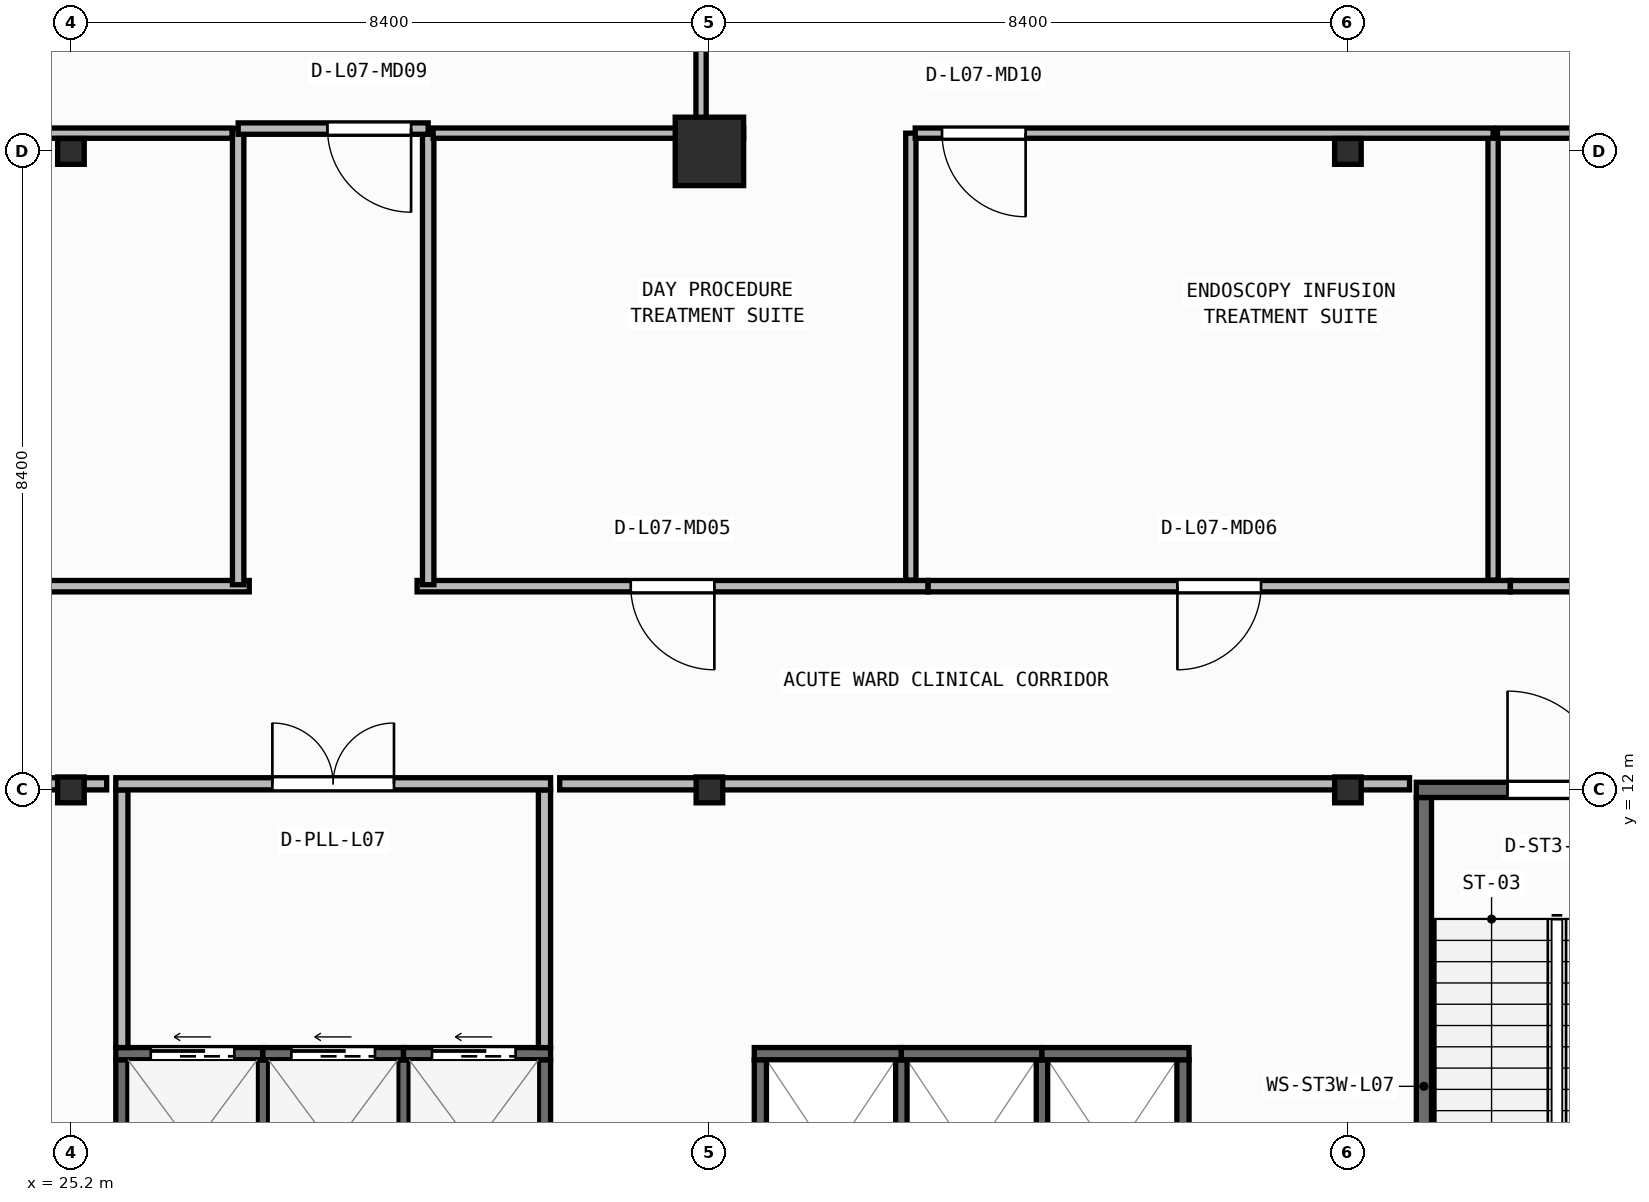
"""IFC4 building model, lengths in metres.
Left out: names, types, materials, properties, quantities, classifications, styles, units other than length and angle.
Written with IfcOpenShell. Run it as: python <this file> out.ifc"""

import sys

from ifc_helpers import new_model, si_unit, direction, frame, frame_2d, origin, origin_2d, place, context, subcontext, project, spatial, rectangle, i_section, extrude, element, fill, save


model = new_model("IFC4")
c1 = context("Model", 3, precision=1e-05, world=origin(), true_north=direction((0.0, 1.0)))
c2 = subcontext(c1, "Body", "Model", "MODEL_VIEW")
j1 = project(units=[si_unit("LENGTHUNIT", "METRE"), si_unit("PLANEANGLEUNIT", "RADIAN")], contexts=[c1])
p1 = place(None, origin())
s1 = spatial("IfcSite", under=j1, at=p1, CompositionType="ELEMENT")
p2 = place(p1, origin())
s2 = spatial("IfcBuilding", under=s1, at=p2, CompositionType="ELEMENT")
p3 = place(p2, frame((0.0, 0.0, 30.4)))
s3 = spatial("IfcBuildingStorey", under=s2, at=p3, CompositionType="ELEMENT", Elevation=30.4)
for number, where, z_axis, x_axis in (
    (1, (25.2, 12.0, 0.0), (0.0, 0.0, 1.0), (1.0, 0.0, 0.0)),
    (2, (33.6, 12.0, 0.0), (0.0, 0.0, 1.0), (1.0, 0.0, 0.0)),
    (3, (42.0, 12.0, 0.0), (0.0, 0.0, 1.0), (1.0, 0.0, 0.0)),
    (4, (25.2, 20.4, 0.0), (0.0, 0.0, 1.0), (1.0, 0.0, 0.0)),
):
    element("IfcColumn", number, at=place(p3, frame(where, z_axis=z_axis, x_axis=x_axis)), inside=s3, PredefinedType="COLUMN", context=c2, shape_type="SweptSolid", body=[
        extrude(i_section(OverallWidth=0.35, OverallDepth=0.34, WebThickness=0.016, FlangeThickness=0.028, at=origin_2d()), origin(), (0.0, 0.0, 1.0), 3.95),
    ])
p4 = place(p3, frame((33.6, 20.4, 0.0), z_axis=(0.0, 0.0, 1.0), x_axis=(1.0, 0.0, 0.0)))
e5 = element("IfcColumn", 5, at=p4, inside=s3, PredefinedType="COLUMN", context=c2, shape_type="SweptSolid", body=[
    extrude(rectangle(XDim=0.9, YDim=0.9, at=origin_2d()), origin(), (0.0, 0.0, 1.0), 3.95),
])
p5 = place(p3, frame((42.0, 20.4, 0.0), z_axis=(0.0, 0.0, 1.0), x_axis=(1.0, 0.0, 0.0)))
e6 = element("IfcColumn", 6, at=p5, inside=s3, PredefinedType="COLUMN", context=c2, shape_type="SweptSolid", body=[
    extrude(i_section(OverallWidth=0.35, OverallDepth=0.34, WebThickness=0.016, FlangeThickness=0.028, at=origin_2d()), origin(), (0.0, 0.0, 1.0), 3.95),
])
p6 = place(p3, frame((43.0, 4.3, 0.0), z_axis=(0.0, 0.0, 1.0), x_axis=(0.0, 1.0, 0.0)))
e7 = element("IfcWall", 7, at=p6, inside=s3, PredefinedType="SHEAR", context=c2, shape_type="SweptSolid", body=[
    extrude(rectangle(XDim=7.6, YDim=0.2, at=frame_2d((3.8, 0.0))), origin(), (0.0, 0.0, 1.0), 3.71),
])
p7 = place(p3, frame((42.9, 12.0, 0.0), z_axis=(0.0, 0.0, 1.0), x_axis=(1.0, 0.0, 0.0)))
e8 = element("IfcWall", 8, at=p7, inside=s3, PredefinedType="SHEAR", context=c2, shape_type="SweptSolid", body=[
    extrude(rectangle(XDim=3.7, YDim=0.2, at=frame_2d((1.85, 0.0))), origin(), (0.0, 0.0, 1.0), 3.71),
])
p8 = place(p7, frame((1.2, 0.0, 0.0)))
e9 = element("IfcOpeningElement", 9, at=p8, cuts=e8, PredefinedType="OPENING", context=c2, shape_type="SweptSolid", body=[
    extrude(rectangle(XDim=1.3, YDim=2.15, at=frame_2d((0.65, 1.075))), frame((0.0, 0.11, 0.0), z_axis=(0.0, -1.0, 0.0), x_axis=(1.0, 0.0, 0.0)), (0.0, 0.0, 1.0), 0.22),
])
for number, where, z_axis, x_axis in (
    (10, (25.87, 5.9, 0.0), (0.0, 0.0, 1.0), (0.0, 1.0, 0.0)),
    (11, (31.43, 5.9, 0.0), (0.0, 0.0, 1.0), (0.0, 1.0, 0.0)),
):
    element("IfcWall", number, at=place(p3, frame(where, z_axis=z_axis, x_axis=x_axis)), inside=s3, PredefinedType="SHEAR", context=c2, shape_type="SweptSolid", body=[
        extrude(rectangle(XDim=2.55, YDim=0.16, at=frame_2d((1.275, 0.0))), origin(), (0.0, 0.0, 1.0), 3.71),
    ])
for number, where, z_axis, x_axis in (
    (12, (27.725, 5.9, 0.0), (0.0, 0.0, 1.0), (0.0, 1.0, 0.0)),
    (13, (29.575, 5.9, 0.0), (0.0, 0.0, 1.0), (0.0, 1.0, 0.0)),
):
    element("IfcWall", number, at=place(p3, frame(where, z_axis=z_axis, x_axis=x_axis)), inside=s3, PredefinedType="SHEAR", context=c2, shape_type="SweptSolid", body=[
        extrude(rectangle(XDim=2.55, YDim=0.15, at=frame_2d((1.275, 0.0))), origin(), (0.0, 0.0, 1.0), 3.71),
    ])
p9 = place(p3, frame((25.79, 8.53, 0.0), z_axis=(0.0, 0.0, 1.0), x_axis=(1.0, 0.0, 0.0)))
e14 = element("IfcWall", 14, at=p9, inside=s3, PredefinedType="SHEAR", context=c2, shape_type="SweptSolid", body=[
    extrude(rectangle(XDim=1.935, YDim=0.16, at=frame_2d((0.968, 0.0))), origin(), (0.0, 0.0, 1.0), 3.71),
])
p10 = place(p9, frame((0.46, 0.0, 0.0)))
e15 = element("IfcOpeningElement", 15, at=p10, cuts=e14, PredefinedType="OPENING", context=c2, shape_type="SweptSolid", body=[
    extrude(rectangle(XDim=1.1, YDim=2.15, at=frame_2d((0.55, 1.075))), frame((0.0, 0.09, 0.0), z_axis=(0.0, -1.0, 0.0), x_axis=(1.0, 0.0, 0.0)), (0.0, 0.0, 1.0), 0.18),
])
p11 = place(p3, frame((27.725, 8.53, 0.0), z_axis=(0.0, 0.0, 1.0), x_axis=(1.0, 0.0, 0.0)))
e16 = element("IfcWall", 16, at=p11, inside=s3, PredefinedType="SHEAR", context=c2, shape_type="SweptSolid", body=[
    extrude(rectangle(XDim=1.85, YDim=0.16, at=frame_2d((0.925, 0.0))), origin(), (0.0, 0.0, 1.0), 3.71),
])
p12 = place(p11, frame((0.375, 0.0, 0.0)))
e17 = element("IfcOpeningElement", 17, at=p12, cuts=e16, PredefinedType="OPENING", context=c2, shape_type="SweptSolid", body=[
    extrude(rectangle(XDim=1.1, YDim=2.15, at=frame_2d((0.55, 1.075))), frame((0.0, 0.09, 0.0), z_axis=(0.0, -1.0, 0.0), x_axis=(1.0, 0.0, 0.0)), (0.0, 0.0, 1.0), 0.18),
])
p13 = place(p3, frame((29.575, 8.53, 0.0), z_axis=(0.0, 0.0, 1.0), x_axis=(1.0, 0.0, 0.0)))
e18 = element("IfcWall", 18, at=p13, inside=s3, PredefinedType="SHEAR", context=c2, shape_type="SweptSolid", body=[
    extrude(rectangle(XDim=1.935, YDim=0.16, at=frame_2d((0.968, 0.0))), origin(), (0.0, 0.0, 1.0), 3.71),
])
p14 = place(p13, frame((0.375, 0.0, 0.0)))
e19 = element("IfcOpeningElement", 19, at=p14, cuts=e18, PredefinedType="OPENING", context=c2, shape_type="SweptSolid", body=[
    extrude(rectangle(XDim=1.1, YDim=2.15, at=frame_2d((0.55, 1.075))), frame((0.0, 0.09, 0.0), z_axis=(0.0, -1.0, 0.0), x_axis=(1.0, 0.0, 0.0)), (0.0, 0.0, 1.0), 0.18),
])
for number, where, z_axis, x_axis in (
    (20, (34.27, 5.9, 0.0), (0.0, 0.0, 1.0), (0.0, 1.0, 0.0)),
    (21, (39.83, 5.9, 0.0), (0.0, 0.0, 1.0), (0.0, 1.0, 0.0)),
):
    element("IfcWall", number, at=place(p3, frame(where, z_axis=z_axis, x_axis=x_axis)), inside=s3, PredefinedType="SHEAR", context=c2, shape_type="SweptSolid", body=[
        extrude(rectangle(XDim=2.55, YDim=0.16, at=frame_2d((1.275, 0.0))), origin(), (0.0, 0.0, 1.0), 3.71),
    ])
for number, where, z_axis, x_axis in (
    (22, (36.125, 5.9, 0.0), (0.0, 0.0, 1.0), (0.0, 1.0, 0.0)),
    (23, (37.975, 5.9, 0.0), (0.0, 0.0, 1.0), (0.0, 1.0, 0.0)),
):
    element("IfcWall", number, at=place(p3, frame(where, z_axis=z_axis, x_axis=x_axis)), inside=s3, PredefinedType="SHEAR", context=c2, shape_type="SweptSolid", body=[
        extrude(rectangle(XDim=2.55, YDim=0.15, at=frame_2d((1.275, 0.0))), origin(), (0.0, 0.0, 1.0), 3.71),
    ])
p15 = place(p3, frame((34.19, 8.53, 0.0), z_axis=(0.0, 0.0, 1.0), x_axis=(1.0, 0.0, 0.0)))
e24 = element("IfcWall", 24, at=p15, inside=s3, PredefinedType="SHEAR", context=c2, shape_type="SweptSolid", body=[
    extrude(rectangle(XDim=1.935, YDim=0.16, at=frame_2d((0.968, 0.0))), origin(), (0.0, 0.0, 1.0), 3.71),
])
p16 = place(p3, frame((36.125, 8.53, 0.0), z_axis=(0.0, 0.0, 1.0), x_axis=(1.0, 0.0, 0.0)))
e25 = element("IfcWall", 25, at=p16, inside=s3, PredefinedType="SHEAR", context=c2, shape_type="SweptSolid", body=[
    extrude(rectangle(XDim=1.85, YDim=0.16, at=frame_2d((0.925, 0.0))), origin(), (0.0, 0.0, 1.0), 3.71),
])
p17 = place(p3, frame((37.975, 8.53, 0.0), z_axis=(0.0, 0.0, 1.0), x_axis=(1.0, 0.0, 0.0)))
e26 = element("IfcWall", 26, at=p17, inside=s3, PredefinedType="SHEAR", context=c2, shape_type="SweptSolid", body=[
    extrude(rectangle(XDim=1.935, YDim=0.16, at=frame_2d((0.967, 0.0))), origin(), (0.0, 0.0, 1.0), 3.71),
])
for number, where, z_axis, x_axis in (
    (27, (25.87, 8.61, 0.0), (0.0, 0.0, 1.0), (0.0, 1.0, 0.0)),
    (28, (31.43, 8.61, 0.0), (0.0, 0.0, 1.0), (0.0, 1.0, 0.0)),
):
    element("IfcWall", number, at=place(p3, frame(where, z_axis=z_axis, x_axis=x_axis)), inside=s3, PredefinedType="PARTITIONING", context=c2, shape_type="SweptSolid", body=[
        extrude(rectangle(XDim=3.39, YDim=0.16, at=frame_2d((1.695, 0.0))), origin(), (0.0, 0.0, 1.0), 3.71),
    ])
p18 = place(p3, frame((25.79, 12.08, 0.0), z_axis=(0.0, 0.0, 1.0), x_axis=(1.0, 0.0, 0.0)))
e29 = element("IfcWall", 29, at=p18, inside=s3, PredefinedType="PARTITIONING", context=c2, shape_type="SweptSolid", body=[
    extrude(rectangle(XDim=5.72, YDim=0.16, at=frame_2d((2.86, 0.0))), origin(), (0.0, 0.0, 1.0), 3.073),
])
p19 = place(p18, frame((2.06, 0.0, 0.0)))
e30 = element("IfcOpeningElement", 30, at=p19, cuts=e29, PredefinedType="OPENING", context=c2, shape_type="SweptSolid", body=[
    extrude(rectangle(XDim=1.6, YDim=2.05, at=frame_2d((0.8, 1.025))), frame((0.0, 0.09, 0.0), z_axis=(0.0, -1.0, 0.0), x_axis=(1.0, 0.0, 0.0)), (0.0, 0.0, 1.0), 0.18),
])
p20 = place(p3, frame((27.546, 14.68, 0.0), z_axis=(0.0, 0.0, 1.0), x_axis=(-1.0, 0.0, 0.0)))
e31 = element("IfcWall", 31, at=p20, inside=s3, PredefinedType="PARTITIONING", context=c2, shape_type="SweptSolid", body=[
    extrude(rectangle(XDim=7.478, YDim=0.15, at=frame_2d((3.739, 0.0))), origin(), (0.0, 0.0, 1.0), 3.71),
])
p21 = place(p20, frame((3.189, 0.0, 0.0)))
e32 = element("IfcOpeningElement", 32, at=p21, cuts=e31, PredefinedType="OPENING", context=c2, shape_type="SweptSolid", body=[
    extrude(rectangle(XDim=1.1, YDim=2.1, at=frame_2d((0.55, 1.05))), frame((0.0, 0.085, 0.0), z_axis=(0.0, -1.0, 0.0), x_axis=(1.0, 0.0, 0.0)), (0.0, 0.0, 1.0), 0.17),
])
p22 = place(p3, frame((36.476, 14.68, 0.0), z_axis=(0.0, 0.0, 1.0), x_axis=(-1.0, 0.0, 0.0)))
e33 = element("IfcWall", 33, at=p22, inside=s3, PredefinedType="PARTITIONING", context=c2, shape_type="SweptSolid", body=[
    extrude(rectangle(XDim=6.722, YDim=0.15, at=frame_2d((3.361, 0.0))), origin(), (0.0, 0.0, 1.0), 3.71),
])
p23 = place(p22, frame((2.811, 0.0, 0.0)))
e34 = element("IfcOpeningElement", 34, at=p23, cuts=e33, PredefinedType="OPENING", context=c2, shape_type="SweptSolid", body=[
    extrude(rectangle(XDim=1.1, YDim=2.1, at=frame_2d((0.55, 1.05))), frame((0.0, 0.085, 0.0), z_axis=(0.0, -1.0, 0.0), x_axis=(1.0, 0.0, 0.0)), (0.0, 0.0, 1.0), 0.17),
])
p24 = place(p3, frame((44.136, 14.68, 0.0), z_axis=(0.0, 0.0, 1.0), x_axis=(-1.0, 0.0, 0.0)))
e35 = element("IfcWall", 35, at=p24, inside=s3, PredefinedType="PARTITIONING", context=c2, shape_type="SweptSolid", body=[
    extrude(rectangle(XDim=7.658, YDim=0.15, at=frame_2d((3.829, 0.0))), origin(), (0.0, 0.0, 1.0), 3.71),
])
p25 = place(p24, frame((3.279, 0.0, 0.0)))
e36 = element("IfcOpeningElement", 36, at=p25, cuts=e35, PredefinedType="OPENING", context=c2, shape_type="SweptSolid", body=[
    extrude(rectangle(XDim=1.1, YDim=2.1, at=frame_2d((0.55, 1.05))), frame((0.0, 0.085, 0.0), z_axis=(0.0, -1.0, 0.0), x_axis=(1.0, 0.0, 0.0)), (0.0, 0.0, 1.0), 0.17),
])
p26 = place(p3, frame((53.986, 14.68, 0.0), z_axis=(0.0, 0.0, 1.0), x_axis=(-1.0, 0.0, 0.0)))
e37 = element("IfcWall", 37, at=p26, inside=s3, PredefinedType="PARTITIONING", context=c2, shape_type="SweptSolid", body=[
    extrude(rectangle(XDim=9.848, YDim=0.15, at=frame_2d((4.924, 0.0))), origin(), (0.0, 0.0, 1.0), 3.71),
])
p27 = place(p26, frame((4.374, 0.0, 0.0)))
e38 = element("IfcOpeningElement", 38, at=p27, cuts=e37, PredefinedType="OPENING", context=c2, shape_type="SweptSolid", body=[
    extrude(rectangle(XDim=1.1, YDim=2.1, at=frame_2d((0.55, 1.05))), frame((0.0, 0.085, 0.0), z_axis=(0.0, -1.0, 0.0), x_axis=(1.0, 0.0, 0.0)), (0.0, 0.0, 1.0), 0.17),
])
for number, where, z_axis, x_axis in (
    (39, (27.4, 20.7, 0.0), (0.0, 0.0, 1.0), (0.0, -1.0, 0.0)),
    (40, (29.9, 14.7, 0.0), (0.0, 0.0, 1.0), (0.0, 1.0, 0.0)),
):
    element("IfcWall", number, at=place(p3, frame(where, z_axis=z_axis, x_axis=x_axis)), inside=s3, PredefinedType="PARTITIONING", context=c2, shape_type="SweptSolid", body=[
        extrude(rectangle(XDim=6.0, YDim=0.15, at=frame_2d((3.0, 0.0))), origin(), (0.0, 0.0, 1.0), 3.71),
    ])
p28 = place(p3, frame((29.9, 20.7, 0.0), z_axis=(0.0, 0.0, 1.0), x_axis=(-1.0, 0.0, 0.0)))
e41 = element("IfcWall", 41, at=p28, inside=s3, PredefinedType="PARTITIONING", context=c2, shape_type="SweptSolid", body=[
    extrude(rectangle(XDim=2.5, YDim=0.15, at=frame_2d((1.25, 0.0))), origin(), (0.0, 0.0, 1.0), 3.073),
])
p29 = place(p28, frame((0.225, 0.0, 0.0)))
e42 = element("IfcOpeningElement", 42, at=p29, cuts=e41, PredefinedType="OPENING", context=c2, shape_type="SweptSolid", body=[
    extrude(rectangle(XDim=1.1, YDim=2.1, at=frame_2d((0.55, 1.05))), frame((0.0, 0.085, 0.0), z_axis=(0.0, -1.0, 0.0), x_axis=(1.0, 0.0, 0.0)), (0.0, 0.0, 1.0), 0.17),
])
p30 = place(p3, frame((27.32, 20.64, 0.0), z_axis=(0.0, 0.0, 1.0), x_axis=(-1.0, 0.0, 0.0)))
e43 = element("IfcWall", 43, at=p30, inside=s3, PredefinedType="PARTITIONING", context=c2, shape_type="SweptSolid", body=[
    extrude(rectangle(XDim=7.423, YDim=0.135, at=frame_2d((3.711, 0.0))), origin(), (0.0, 0.0, 1.0), 3.073),
])
p31 = place(p3, frame((36.25, 14.76, 0.0), z_axis=(0.0, 0.0, 1.0), x_axis=(0.0, 1.0, 0.0)))
e44 = element("IfcWall", 44, at=p31, inside=s3, PredefinedType="PARTITIONING", context=c2, shape_type="SweptSolid", body=[
    extrude(rectangle(XDim=5.88, YDim=0.135, at=frame_2d((2.94, 0.0))), origin(), (0.0, 0.0, 1.0), 3.71),
])
p32 = place(p3, frame((34.05, 20.64, 0.0), z_axis=(0.0, 0.0, 1.0), x_axis=(-1.0, 0.0, 0.0)))
e45 = element("IfcWall", 45, at=p32, inside=s3, PredefinedType="PARTITIONING", context=c2, shape_type="SweptSolid", body=[
    extrude(rectangle(XDim=4.085, YDim=0.135, at=frame_2d((2.042, 0.0))), origin(), (0.0, 0.0, 1.0), 3.073),
])
p33 = place(p3, frame((43.91, 14.76, 0.0), z_axis=(0.0, 0.0, 1.0), x_axis=(0.0, 1.0, 0.0)))
e46 = element("IfcWall", 46, at=p33, inside=s3, PredefinedType="PARTITIONING", context=c2, shape_type="SweptSolid", body=[
    extrude(rectangle(XDim=5.88, YDim=0.135, at=frame_2d((2.94, 0.0))), origin(), (0.0, 0.0, 1.0), 3.71),
])
p34 = place(p3, frame((43.91, 20.64, 0.0), z_axis=(0.0, 0.0, 1.0), x_axis=(-1.0, 0.0, 0.0)))
e47 = element("IfcWall", 47, at=p34, inside=s3, PredefinedType="PARTITIONING", context=c2, shape_type="SweptSolid", body=[
    extrude(rectangle(XDim=7.602, YDim=0.135, at=frame_2d((3.801, 0.0))), origin(), (0.0, 0.0, 1.0), 3.073),
])
p35 = place(p34, frame((6.15, 0.0, 0.0)))
e48 = element("IfcOpeningElement", 48, at=p35, cuts=e47, PredefinedType="OPENING", context=c2, shape_type="SweptSolid", body=[
    extrude(rectangle(XDim=1.1, YDim=2.1, at=frame_2d((0.55, 1.05))), frame((0.0, 0.077, 0.0), z_axis=(0.0, -1.0, 0.0), x_axis=(1.0, 0.0, 0.0)), (0.0, 0.0, 1.0), 0.155),
])
p36 = place(p3, frame((53.76, 20.64, 0.0), z_axis=(0.0, 0.0, 1.0), x_axis=(-1.0, 0.0, 0.0)))
e49 = element("IfcWall", 49, at=p36, inside=s3, PredefinedType="PARTITIONING", context=c2, shape_type="SweptSolid", body=[
    extrude(rectangle(XDim=9.792, YDim=0.135, at=frame_2d((4.896, 0.0))), origin(), (0.0, 0.0, 1.0), 3.073),
])
p37 = place(p3, frame((33.49, 20.698, 0.0), z_axis=(0.0, 0.0, 1.0), x_axis=(0.0, 1.0, 0.0)))
e50 = element("IfcWall", 50, at=p37, inside=s3, PredefinedType="PARTITIONING", context=c2, shape_type="SweptSolid", body=[
    extrude(rectangle(XDim=6.442, YDim=0.135, at=frame_2d((3.221, 0.0))), origin(), (0.0, 0.0, 1.0), 3.073),
])
p38 = place(p3, frame((24.02, 12.08, 0.0), z_axis=(0.0, 0.0, 1.0), x_axis=(1.0, 0.0, 0.0)))
e51 = element("IfcWall", 51, at=p38, inside=s3, PredefinedType="PARTITIONING", context=c2, shape_type="SweptSolid", body=[
    extrude(rectangle(XDim=1.65, YDim=0.16, at=frame_2d((0.825, 0.0))), origin(), (0.0, 0.0, 1.0), 3.073),
])
p39 = place(p3, frame((31.63, 12.08, 0.0), z_axis=(0.0, 0.0, 1.0), x_axis=(1.0, 0.0, 0.0)))
e52 = element("IfcWall", 52, at=p39, inside=s3, PredefinedType="PARTITIONING", context=c2, shape_type="SweptSolid", body=[
    extrude(rectangle(XDim=11.181, YDim=0.16, at=frame_2d((5.59, 0.0))), origin(), (0.0, 0.0, 1.0), 3.073),
])
p40 = place(p8, origin())
e53 = element("IfcDoor", 53, at=p40, inside=s3, OperationType="SINGLE_SWING_LEFT", PredefinedType="DOOR", context=c2, shape_type="SweptSolid", body=[
    extrude(rectangle(XDim=1.3, YDim=2.15, at=frame_2d((0.65, 1.075))), frame((0.0, 0.025, 0.0), z_axis=(0.0, -1.0, 0.0), x_axis=(1.0, 0.0, 0.0)), (0.0, 0.0, 1.0), 0.05),
])
fill(e9, e53)
p41 = place(p10, origin())
e54 = element("IfcDoor", 54, at=p41, inside=s3, OperationType="SLIDING_TO_LEFT", PredefinedType="DOOR", context=c2, shape_type="SweptSolid", body=[
    extrude(rectangle(XDim=1.1, YDim=2.15, at=frame_2d((0.55, 1.075))), frame((0.0, 0.025, 0.0), z_axis=(0.0, -1.0, 0.0), x_axis=(1.0, 0.0, 0.0)), (0.0, 0.0, 1.0), 0.05),
])
fill(e15, e54)
p42 = place(p12, origin())
e55 = element("IfcDoor", 55, at=p42, inside=s3, OperationType="SLIDING_TO_LEFT", PredefinedType="DOOR", context=c2, shape_type="SweptSolid", body=[
    extrude(rectangle(XDim=1.1, YDim=2.15, at=frame_2d((0.55, 1.075))), frame((0.0, 0.025, 0.0), z_axis=(0.0, -1.0, 0.0), x_axis=(1.0, 0.0, 0.0)), (0.0, 0.0, 1.0), 0.05),
])
fill(e17, e55)
p43 = place(p14, origin())
e56 = element("IfcDoor", 56, at=p43, inside=s3, OperationType="SLIDING_TO_LEFT", PredefinedType="DOOR", context=c2, shape_type="SweptSolid", body=[
    extrude(rectangle(XDim=1.1, YDim=2.15, at=frame_2d((0.55, 1.075))), frame((0.0, 0.025, 0.0), z_axis=(0.0, -1.0, 0.0), x_axis=(1.0, 0.0, 0.0)), (0.0, 0.0, 1.0), 0.05),
])
fill(e19, e56)
p44 = place(p19, origin())
e57 = element("IfcDoor", 57, at=p44, inside=s3, OperationType="DOUBLE_DOOR_SINGLE_SWING", PredefinedType="DOOR", context=c2, shape_type="SweptSolid", body=[
    extrude(rectangle(XDim=1.6, YDim=2.05, at=frame_2d((0.8, 1.025))), frame((0.0, 0.025, 0.0), z_axis=(0.0, -1.0, 0.0), x_axis=(1.0, 0.0, 0.0)), (0.0, 0.0, 1.0), 0.05),
])
fill(e30, e57)
p45 = place(p23, origin())
e58 = element("IfcDoor", 58, at=p45, inside=s3, OperationType="SINGLE_SWING_LEFT", PredefinedType="DOOR", context=c2, shape_type="SweptSolid", body=[
    extrude(rectangle(XDim=1.1, YDim=2.1, at=frame_2d((0.55, 1.05))), frame((0.0, 0.025, 0.0), z_axis=(0.0, -1.0, 0.0), x_axis=(1.0, 0.0, 0.0)), (0.0, 0.0, 1.0), 0.05),
])
fill(e34, e58)
p46 = place(p25, origin())
e59 = element("IfcDoor", 59, at=p46, inside=s3, OperationType="SINGLE_SWING_RIGHT", PredefinedType="DOOR", context=c2, shape_type="SweptSolid", body=[
    extrude(rectangle(XDim=1.1, YDim=2.1, at=frame_2d((0.55, 1.05))), frame((0.0, 0.025, 0.0), z_axis=(0.0, -1.0, 0.0), x_axis=(1.0, 0.0, 0.0)), (0.0, 0.0, 1.0), 0.05),
])
fill(e36, e59)
p47 = place(p29, origin())
e60 = element("IfcDoor", 60, at=p47, inside=s3, OperationType="SINGLE_SWING_LEFT", PredefinedType="DOOR", context=c2, shape_type="SweptSolid", body=[
    extrude(rectangle(XDim=1.1, YDim=2.1, at=frame_2d((0.55, 1.05))), frame((0.0, 0.025, 0.0), z_axis=(0.0, -1.0, 0.0), x_axis=(1.0, 0.0, 0.0)), (0.0, 0.0, 1.0), 0.05),
])
fill(e42, e60)
p48 = place(p35, origin())
e61 = element("IfcDoor", 61, at=p48, inside=s3, OperationType="SINGLE_SWING_LEFT", PredefinedType="DOOR", context=c2, shape_type="SweptSolid", body=[
    extrude(rectangle(XDim=1.1, YDim=2.1, at=frame_2d((0.55, 1.05))), frame((0.0, 0.025, 0.0), z_axis=(0.0, -1.0, 0.0), x_axis=(1.0, 0.0, 0.0)), (0.0, 0.0, 1.0), 0.05),
])
fill(e48, e61)
save(model, sys.argv[1])
